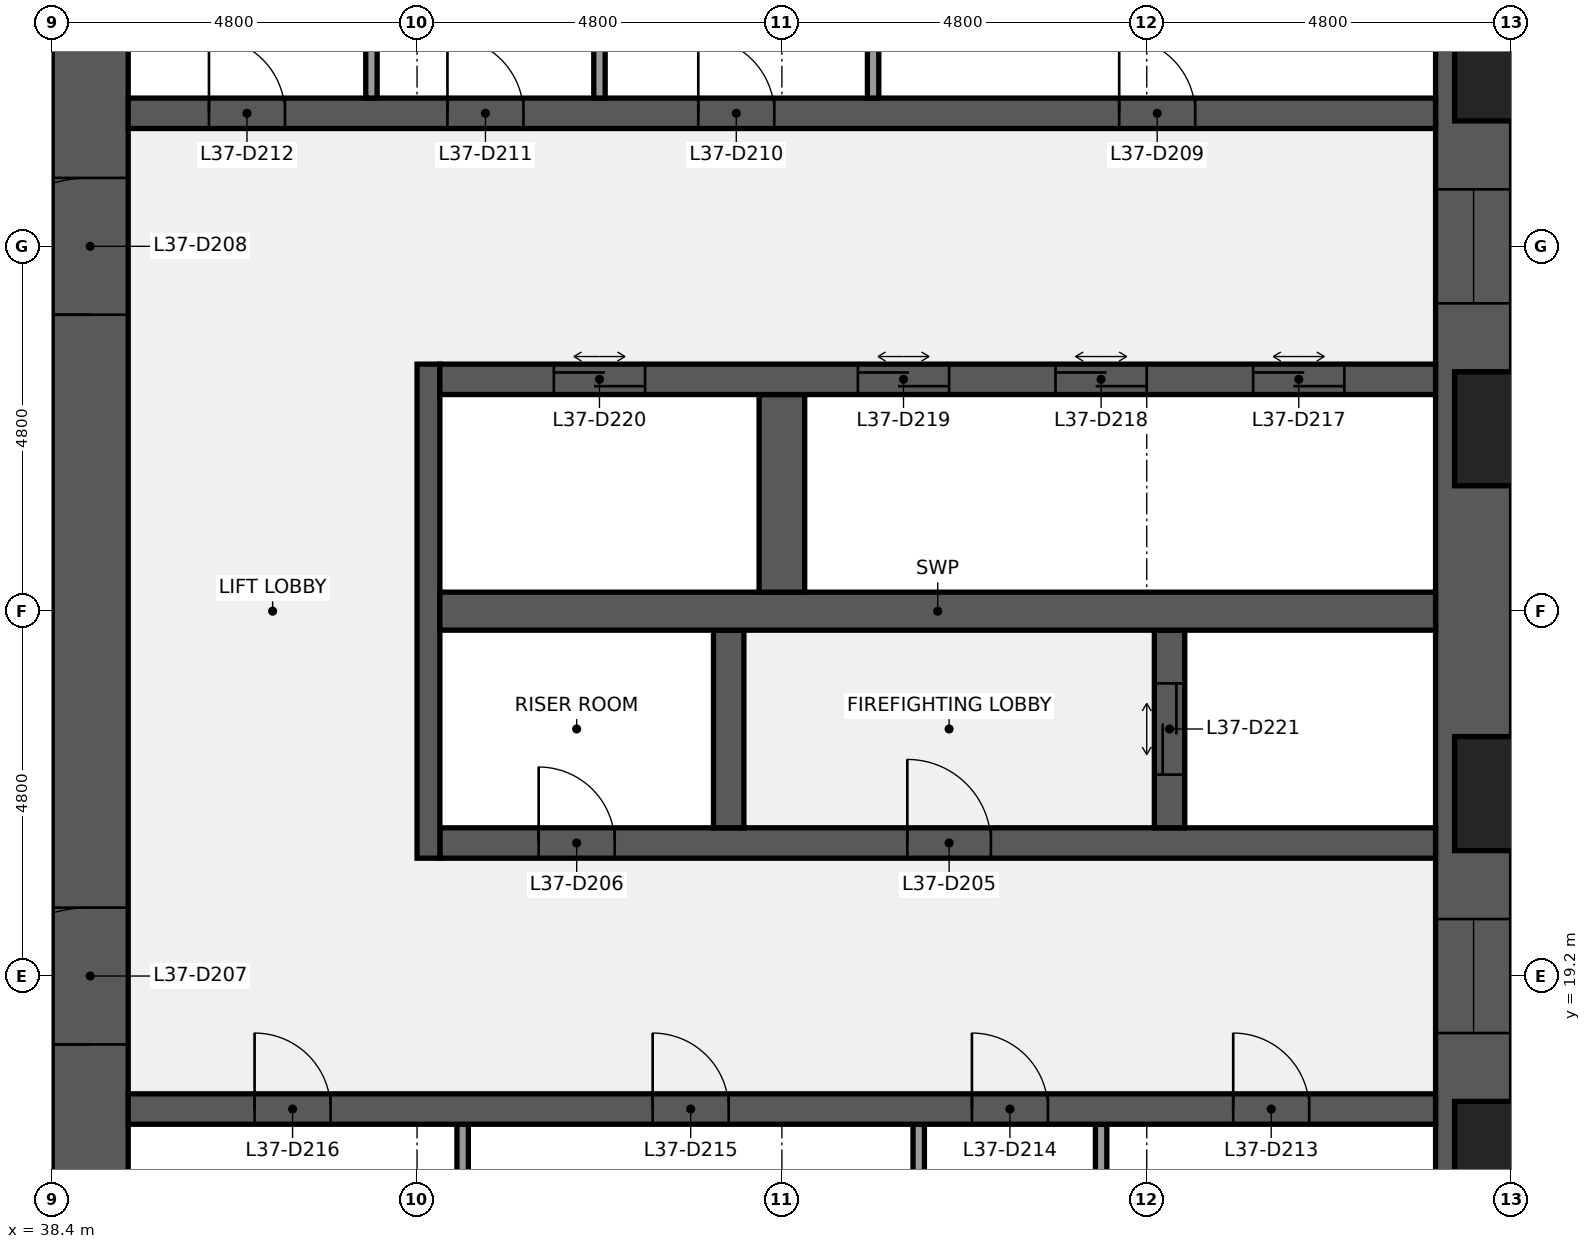
"""IFC4 building model, lengths in metres.
Left out: names, types, materials, properties, quantities, classifications, styles, units other than length and angle.
Written with IfcOpenShell. Run it as: python <this file> out.ifc"""

import sys

from ifc_helpers import new_model, si_unit, direction, frame, frame_2d, origin, place, context, subcontext, project, spatial, rectangle, extrude, element, fill, save


model = new_model("IFC4")
c1 = context("Model", 3, precision=1e-05, world=origin(), true_north=direction((0.0, 1.0)))
c2 = subcontext(c1, "Body", "Model", "MODEL_VIEW")
j1 = project(units=[si_unit("LENGTHUNIT", "METRE"), si_unit("PLANEANGLEUNIT", "RADIAN")], contexts=[c1])
p1 = place(None, origin())
s1 = spatial("IfcSite", under=j1, at=p1, CompositionType="ELEMENT")
p2 = place(p1, origin())
s2 = spatial("IfcBuilding", under=s1, at=p2, CompositionType="ELEMENT")
p3 = place(p2, frame((0.0, 0.0, 168.1)))
s3 = spatial("IfcBuildingStorey", under=s2, at=p3, CompositionType="ELEMENT", Elevation=168.1)
p4 = place(p3, frame((57.1, 38.4, 0.0), z_axis=(0.0, 0.0, 1.0), x_axis=(0.0, -1.0, 0.0)))
e1 = element("IfcWall", 1, at=p4, inside=s3, PredefinedType="SHEAR", context=c2, shape_type="SweptSolid", body=[
    extrude(rectangle(XDim=28.8, YDim=1.0, at=frame_2d((14.4, 0.0))), origin(), (0.0, 0.0, 1.0), 3.84),
])
p5 = place(p4, frame((18.45, 0.0, 0.9)))
e2 = element("IfcOpeningElement", 2, at=p5, cuts=e1, PredefinedType="OPENING", context=c2, shape_type="SweptSolid", body=[
    extrude(rectangle(XDim=1.5, YDim=1.5, at=frame_2d((0.75, 0.75))), frame((0.0, 0.51, 0.0), z_axis=(0.0, -1.0, 0.0), x_axis=(1.0, 0.0, 0.0)), (0.0, 0.0, 1.0), 1.02),
])
p6 = place(p4, frame((8.85, 0.0, 0.9)))
e3 = element("IfcOpeningElement", 3, at=p6, cuts=e1, PredefinedType="OPENING", context=c2, shape_type="SweptSolid", body=[
    extrude(rectangle(XDim=1.5, YDim=1.5, at=frame_2d((0.75, 0.75))), frame((0.0, 0.51, 0.0), z_axis=(0.0, -1.0, 0.0), x_axis=(1.0, 0.0, 0.0)), (0.0, 0.0, 1.0), 1.02),
])
p7 = place(p3, frame((38.9, 9.6, 0.0), z_axis=(0.0, 0.0, 1.0), x_axis=(0.0, 1.0, 0.0)))
e4 = element("IfcWall", 4, at=p7, inside=s3, PredefinedType="SHEAR", context=c2, shape_type="SweptSolid", body=[
    extrude(rectangle(XDim=28.8, YDim=1.0, at=frame_2d((14.4, 0.0))), origin(), (0.0, 0.0, 1.0), 3.84),
])
p8 = place(p7, frame((8.7, 0.0, 0.0)))
e5 = element("IfcOpeningElement", 5, at=p8, cuts=e4, PredefinedType="OPENING", context=c2, shape_type="SweptSolid", body=[
    extrude(rectangle(XDim=1.8, YDim=2.1, at=frame_2d((0.9, 1.05))), frame((0.0, 0.51, 0.0), z_axis=(0.0, -1.0, 0.0), x_axis=(1.0, 0.0, 0.0)), (0.0, 0.0, 1.0), 1.02),
])
p9 = place(p7, frame((18.3, 0.0, 0.0)))
e6 = element("IfcOpeningElement", 6, at=p9, cuts=e4, PredefinedType="OPENING", context=c2, shape_type="SweptSolid", body=[
    extrude(rectangle(XDim=1.8, YDim=2.1, at=frame_2d((0.9, 1.05))), frame((0.0, 0.51, 0.0), z_axis=(0.0, -1.0, 0.0), x_axis=(1.0, 0.0, 0.0)), (0.0, 0.0, 1.0), 1.02),
])
for number, where, z_axis, x_axis in (
    (7, (52.2, 14.65, 0.0), (0.0, 0.0, 1.0), (0.0, 1.0, 0.0)),
    (8, (49.8, 14.65, 0.0), (0.0, 0.0, 1.0), (0.0, 1.0, 0.0)),
    (9, (43.8, 14.65, 0.0), (0.0, 0.0, 1.0), (0.0, 1.0, 0.0)),
):
    element("IfcWall", number, at=place(p3, frame(where, z_axis=z_axis, x_axis=x_axis)), inside=s3, PredefinedType="PARTITIONING", context=c2, shape_type="SweptSolid", body=[
        extrude(rectangle(XDim=2.6, YDim=0.15, at=frame_2d((1.3, 0.0))), origin(), (0.0, 0.0, 1.0), 3.84),
    ])
p10 = place(p3, frame((39.4, 17.45, 0.0), z_axis=(0.0, 0.0, 1.0), x_axis=(1.0, 0.0, 0.0)))
e10 = element("IfcWall", 10, at=p10, inside=s3, PredefinedType="SHEAR", context=c2, shape_type="SweptSolid", body=[
    extrude(rectangle(XDim=17.2, YDim=0.4, at=frame_2d((8.6, 0.0))), origin(), (0.0, 0.0, 1.0), 3.84),
])
p11 = place(p10, frame((14.538, 0.0, 0.0)))
e11 = element("IfcOpeningElement", 11, at=p11, cuts=e10, PredefinedType="OPENING", context=c2, shape_type="SweptSolid", body=[
    extrude(rectangle(XDim=1.0, YDim=2.1, at=frame_2d((0.5, 1.05))), frame((0.0, 0.21, 0.0), z_axis=(0.0, -1.0, 0.0), x_axis=(1.0, 0.0, 0.0)), (0.0, 0.0, 1.0), 0.42),
])
p12 = place(p10, frame((11.1, 0.0, 0.0)))
e12 = element("IfcOpeningElement", 12, at=p12, cuts=e10, PredefinedType="OPENING", context=c2, shape_type="SweptSolid", body=[
    extrude(rectangle(XDim=1.0, YDim=2.1, at=frame_2d((0.5, 1.05))), frame((0.0, 0.21, 0.0), z_axis=(0.0, -1.0, 0.0), x_axis=(1.0, 0.0, 0.0)), (0.0, 0.0, 1.0), 0.42),
])
p13 = place(p10, frame((6.9, 0.0, 0.0)))
e13 = element("IfcOpeningElement", 13, at=p13, cuts=e10, PredefinedType="OPENING", context=c2, shape_type="SweptSolid", body=[
    extrude(rectangle(XDim=1.0, YDim=2.1, at=frame_2d((0.5, 1.05))), frame((0.0, 0.21, 0.0), z_axis=(0.0, -1.0, 0.0), x_axis=(1.0, 0.0, 0.0)), (0.0, 0.0, 1.0), 0.42),
])
p14 = place(p10, frame((1.663, 0.0, 0.0)))
e14 = element("IfcOpeningElement", 14, at=p14, cuts=e10, PredefinedType="OPENING", context=c2, shape_type="SweptSolid", body=[
    extrude(rectangle(XDim=1.0, YDim=2.1, at=frame_2d((0.5, 1.05))), frame((0.0, 0.21, 0.0), z_axis=(0.0, -1.0, 0.0), x_axis=(1.0, 0.0, 0.0)), (0.0, 0.0, 1.0), 0.42),
])
p15 = place(p3, frame((43.5, 20.95, 0.0), z_axis=(0.0, 0.0, 1.0), x_axis=(1.0, 0.0, 0.0)))
e15 = element("IfcWall", 15, at=p15, inside=s3, PredefinedType="SHEAR", context=c2, shape_type="SweptSolid", body=[
    extrude(rectangle(XDim=13.1, YDim=0.4, at=frame_2d((6.55, 0.0))), origin(), (0.0, 0.0, 1.0), 3.84),
])
p16 = place(p15, frame((6.15, 0.0, 0.0)))
e16 = element("IfcOpeningElement", 16, at=p16, cuts=e15, PredefinedType="OPENING", context=c2, shape_type="SweptSolid", body=[
    extrude(rectangle(XDim=1.1, YDim=2.1, at=frame_2d((0.55, 1.05))), frame((0.0, 0.21, 0.0), z_axis=(0.0, -1.0, 0.0), x_axis=(1.0, 0.0, 0.0)), (0.0, 0.0, 1.0), 0.42),
])
p17 = place(p15, frame((1.3, 0.0, 0.0)))
e17 = element("IfcOpeningElement", 17, at=p17, cuts=e15, PredefinedType="OPENING", context=c2, shape_type="SweptSolid", body=[
    extrude(rectangle(XDim=1.0, YDim=2.1, at=frame_2d((0.5, 1.05))), frame((0.0, 0.21, 0.0), z_axis=(0.0, -1.0, 0.0), x_axis=(1.0, 0.0, 0.0)), (0.0, 0.0, 1.0), 0.42),
])
p18 = place(p3, frame((43.35, 20.75, 0.0), z_axis=(0.0, 0.0, 1.0), x_axis=(0.0, 1.0, 0.0)))
e18 = element("IfcWall", 18, at=p18, inside=s3, PredefinedType="SHEAR", context=c2, shape_type="SweptSolid", body=[
    extrude(rectangle(XDim=6.5, YDim=0.3, at=frame_2d((3.25, 0.0))), origin(), (0.0, 0.0, 1.0), 3.84),
])
p19 = place(p3, frame((53.1, 21.15, 0.0), z_axis=(0.0, 0.0, 1.0), x_axis=(0.0, 1.0, 0.0)))
e19 = element("IfcWall", 19, at=p19, inside=s3, PredefinedType="SHEAR", context=c2, shape_type="SweptSolid", body=[
    extrude(rectangle(XDim=2.6, YDim=0.4, at=frame_2d((1.3, 0.0))), origin(), (0.0, 0.0, 1.0), 3.84),
])
p20 = place(p19, frame((0.7, 0.0, 0.0)))
e20 = element("IfcOpeningElement", 20, at=p20, cuts=e19, PredefinedType="OPENING", context=c2, shape_type="SweptSolid", body=[
    extrude(rectangle(XDim=1.2, YDim=2.1, at=frame_2d((0.6, 1.05))), frame((0.0, 0.21, 0.0), z_axis=(0.0, -1.0, 0.0), x_axis=(1.0, 0.0, 0.0)), (0.0, 0.0, 1.0), 0.42),
])
p21 = place(p3, frame((47.3, 21.15, 0.0), z_axis=(0.0, 0.0, 1.0), x_axis=(0.0, 1.0, 0.0)))
e21 = element("IfcWall", 21, at=p21, inside=s3, PredefinedType="SHEAR", context=c2, shape_type="SweptSolid", body=[
    extrude(rectangle(XDim=2.6, YDim=0.4, at=frame_2d((1.3, 0.0))), origin(), (0.0, 0.0, 1.0), 3.84),
])
p22 = place(p3, frame((43.5, 24.0, 0.0), z_axis=(0.0, 0.0, 1.0), x_axis=(1.0, 0.0, 0.0)))
e22 = element("IfcWall", 22, at=p22, inside=s3, PredefinedType="SHEAR", context=c2, shape_type="SweptSolid", body=[
    extrude(rectangle(XDim=13.1, YDim=0.5, at=frame_2d((6.55, 0.0))), origin(), (0.0, 0.0, 1.0), 3.84),
])
p23 = place(p3, frame((48.0, 24.25, 0.0), z_axis=(0.0, 0.0, 1.0), x_axis=(0.0, 1.0, 0.0)))
e23 = element("IfcWall", 23, at=p23, inside=s3, PredefinedType="SHEAR", context=c2, shape_type="SweptSolid", body=[
    extrude(rectangle(XDim=2.6, YDim=0.6, at=frame_2d((1.3, 0.0))), origin(), (0.0, 0.0, 1.0), 3.84),
])
p24 = place(p3, frame((43.5, 27.05, 0.0), z_axis=(0.0, 0.0, 1.0), x_axis=(1.0, 0.0, 0.0)))
e24 = element("IfcWall", 24, at=p24, inside=s3, PredefinedType="SHEAR", context=c2, shape_type="SweptSolid", body=[
    extrude(rectangle(XDim=13.1, YDim=0.4, at=frame_2d((6.55, 0.0))), origin(), (0.0, 0.0, 1.0), 3.84),
])
p25 = place(p24, frame((10.7, 0.0, 0.0)))
e25 = element("IfcOpeningElement", 25, at=p25, cuts=e24, PredefinedType="OPENING", context=c2, shape_type="SweptSolid", body=[
    extrude(rectangle(XDim=1.2, YDim=2.1, at=frame_2d((0.6, 1.05))), frame((0.0, 0.21, 0.0), z_axis=(0.0, -1.0, 0.0), x_axis=(1.0, 0.0, 0.0)), (0.0, 0.0, 1.0), 0.42),
])
p26 = place(p24, frame((8.1, 0.0, 0.0)))
e26 = element("IfcOpeningElement", 26, at=p26, cuts=e24, PredefinedType="OPENING", context=c2, shape_type="SweptSolid", body=[
    extrude(rectangle(XDim=1.2, YDim=2.1, at=frame_2d((0.6, 1.05))), frame((0.0, 0.21, 0.0), z_axis=(0.0, -1.0, 0.0), x_axis=(1.0, 0.0, 0.0)), (0.0, 0.0, 1.0), 0.42),
])
p27 = place(p24, frame((5.5, 0.0, 0.0)))
e27 = element("IfcOpeningElement", 27, at=p27, cuts=e24, PredefinedType="OPENING", context=c2, shape_type="SweptSolid", body=[
    extrude(rectangle(XDim=1.2, YDim=2.1, at=frame_2d((0.6, 1.05))), frame((0.0, 0.21, 0.0), z_axis=(0.0, -1.0, 0.0), x_axis=(1.0, 0.0, 0.0)), (0.0, 0.0, 1.0), 0.42),
])
p28 = place(p24, frame((1.5, 0.0, 0.0)))
e28 = element("IfcOpeningElement", 28, at=p28, cuts=e24, PredefinedType="OPENING", context=c2, shape_type="SweptSolid", body=[
    extrude(rectangle(XDim=1.2, YDim=2.1, at=frame_2d((0.6, 1.05))), frame((0.0, 0.21, 0.0), z_axis=(0.0, -1.0, 0.0), x_axis=(1.0, 0.0, 0.0)), (0.0, 0.0, 1.0), 0.42),
])
p29 = place(p3, frame((39.4, 30.55, 0.0), z_axis=(0.0, 0.0, 1.0), x_axis=(1.0, 0.0, 0.0)))
e29 = element("IfcWall", 29, at=p29, inside=s3, PredefinedType="SHEAR", context=c2, shape_type="SweptSolid", body=[
    extrude(rectangle(XDim=17.2, YDim=0.4, at=frame_2d((8.6, 0.0))), origin(), (0.0, 0.0, 1.0), 3.84),
])
p30 = place(p29, frame((13.038, 0.0, 0.0)))
e30 = element("IfcOpeningElement", 30, at=p30, cuts=e29, PredefinedType="OPENING", context=c2, shape_type="SweptSolid", body=[
    extrude(rectangle(XDim=1.0, YDim=2.1, at=frame_2d((0.5, 1.05))), frame((0.0, 0.21, 0.0), z_axis=(0.0, -1.0, 0.0), x_axis=(1.0, 0.0, 0.0)), (0.0, 0.0, 1.0), 0.42),
])
p31 = place(p29, frame((7.5, 0.0, 0.0)))
e31 = element("IfcOpeningElement", 31, at=p31, cuts=e29, PredefinedType="OPENING", context=c2, shape_type="SweptSolid", body=[
    extrude(rectangle(XDim=1.0, YDim=2.1, at=frame_2d((0.5, 1.05))), frame((0.0, 0.21, 0.0), z_axis=(0.0, -1.0, 0.0), x_axis=(1.0, 0.0, 0.0)), (0.0, 0.0, 1.0), 0.42),
])
p32 = place(p29, frame((4.2, 0.0, 0.0)))
e32 = element("IfcOpeningElement", 32, at=p32, cuts=e29, PredefinedType="OPENING", context=c2, shape_type="SweptSolid", body=[
    extrude(rectangle(XDim=1.0, YDim=2.1, at=frame_2d((0.5, 1.05))), frame((0.0, 0.21, 0.0), z_axis=(0.0, -1.0, 0.0), x_axis=(1.0, 0.0, 0.0)), (0.0, 0.0, 1.0), 0.42),
])
p33 = place(p29, frame((1.062, 0.0, 0.0)))
e33 = element("IfcOpeningElement", 33, at=p33, cuts=e29, PredefinedType="OPENING", context=c2, shape_type="SweptSolid", body=[
    extrude(rectangle(XDim=1.0, YDim=2.1, at=frame_2d((0.5, 1.05))), frame((0.0, 0.21, 0.0), z_axis=(0.0, -1.0, 0.0), x_axis=(1.0, 0.0, 0.0)), (0.0, 0.0, 1.0), 0.42),
])
for number, where, z_axis, x_axis in (
    (34, (49.2, 30.75, 0.0), (0.0, 0.0, 1.0), (0.0, 1.0, 0.0)),
    (35, (45.6, 30.75, 0.0), (0.0, 0.0, 1.0), (0.0, 1.0, 0.0)),
    (36, (42.6, 30.75, 0.0), (0.0, 0.0, 1.0), (0.0, 1.0, 0.0)),
):
    element("IfcWall", number, at=place(p3, frame(where, z_axis=z_axis, x_axis=x_axis)), inside=s3, PredefinedType="PARTITIONING", context=c2, shape_type="SweptSolid", body=[
        extrude(rectangle(XDim=2.6, YDim=0.15, at=frame_2d((1.3, 0.0))), origin(), (0.0, 0.0, 1.0), 3.84),
    ])
p34 = place(p16, origin())
e37 = element("IfcDoor", 37, at=p34, inside=s3, OperationType="SINGLE_SWING_LEFT", PredefinedType="DOOR", context=c2, shape_type="SweptSolid", body=[
    extrude(rectangle(XDim=1.1, YDim=2.1, at=frame_2d((0.55, 1.05))), frame((0.0, 0.025, 0.0), z_axis=(0.0, -1.0, 0.0), x_axis=(1.0, 0.0, 0.0)), (0.0, 0.0, 1.0), 0.05),
])
fill(e16, e37)
p35 = place(p17, origin())
e38 = element("IfcDoor", 38, at=p35, inside=s3, OperationType="SINGLE_SWING_LEFT", PredefinedType="DOOR", context=c2, shape_type="SweptSolid", body=[
    extrude(rectangle(XDim=1.0, YDim=2.1, at=frame_2d((0.5, 1.05))), frame((0.0, 0.025, 0.0), z_axis=(0.0, -1.0, 0.0), x_axis=(1.0, 0.0, 0.0)), (0.0, 0.0, 1.0), 0.05),
])
fill(e17, e38)
p36 = place(p8, origin())
e39 = element("IfcDoor", 39, at=p36, inside=s3, OperationType="DOUBLE_DOOR_SINGLE_SWING", PredefinedType="DOOR", context=c2, shape_type="SweptSolid", body=[
    extrude(rectangle(XDim=1.8, YDim=2.1, at=frame_2d((0.9, 1.05))), frame((0.0, 0.025, 0.0), z_axis=(0.0, -1.0, 0.0), x_axis=(1.0, 0.0, 0.0)), (0.0, 0.0, 1.0), 0.05),
])
fill(e5, e39)
p37 = place(p9, origin())
e40 = element("IfcDoor", 40, at=p37, inside=s3, OperationType="DOUBLE_DOOR_SINGLE_SWING", PredefinedType="DOOR", context=c2, shape_type="SweptSolid", body=[
    extrude(rectangle(XDim=1.8, YDim=2.1, at=frame_2d((0.9, 1.05))), frame((0.0, 0.025, 0.0), z_axis=(0.0, -1.0, 0.0), x_axis=(1.0, 0.0, 0.0)), (0.0, 0.0, 1.0), 0.05),
])
fill(e6, e40)
p38 = place(p30, origin())
e41 = element("IfcDoor", 41, at=p38, inside=s3, OperationType="SINGLE_SWING_LEFT", PredefinedType="DOOR", context=c2, shape_type="SweptSolid", body=[
    extrude(rectangle(XDim=1.0, YDim=2.1, at=frame_2d((0.5, 1.05))), frame((0.0, 0.025, 0.0), z_axis=(0.0, -1.0, 0.0), x_axis=(1.0, 0.0, 0.0)), (0.0, 0.0, 1.0), 0.05),
])
fill(e30, e41)
p39 = place(p31, origin())
e42 = element("IfcDoor", 42, at=p39, inside=s3, OperationType="SINGLE_SWING_LEFT", PredefinedType="DOOR", context=c2, shape_type="SweptSolid", body=[
    extrude(rectangle(XDim=1.0, YDim=2.1, at=frame_2d((0.5, 1.05))), frame((0.0, 0.025, 0.0), z_axis=(0.0, -1.0, 0.0), x_axis=(1.0, 0.0, 0.0)), (0.0, 0.0, 1.0), 0.05),
])
fill(e31, e42)
p40 = place(p32, origin())
e43 = element("IfcDoor", 43, at=p40, inside=s3, OperationType="SINGLE_SWING_LEFT", PredefinedType="DOOR", context=c2, shape_type="SweptSolid", body=[
    extrude(rectangle(XDim=1.0, YDim=2.1, at=frame_2d((0.5, 1.05))), frame((0.0, 0.025, 0.0), z_axis=(0.0, -1.0, 0.0), x_axis=(1.0, 0.0, 0.0)), (0.0, 0.0, 1.0), 0.05),
])
fill(e32, e43)
p41 = place(p33, origin())
e44 = element("IfcDoor", 44, at=p41, inside=s3, OperationType="SINGLE_SWING_LEFT", PredefinedType="DOOR", context=c2, shape_type="SweptSolid", body=[
    extrude(rectangle(XDim=1.0, YDim=2.1, at=frame_2d((0.5, 1.05))), frame((0.0, 0.025, 0.0), z_axis=(0.0, -1.0, 0.0), x_axis=(1.0, 0.0, 0.0)), (0.0, 0.0, 1.0), 0.05),
])
fill(e33, e44)
p42 = place(p11, origin())
e45 = element("IfcDoor", 45, at=p42, inside=s3, OperationType="SINGLE_SWING_LEFT", PredefinedType="DOOR", context=c2, shape_type="SweptSolid", body=[
    extrude(rectangle(XDim=1.0, YDim=2.1, at=frame_2d((0.5, 1.05))), frame((0.0, 0.025, 0.0), z_axis=(0.0, -1.0, 0.0), x_axis=(1.0, 0.0, 0.0)), (0.0, 0.0, 1.0), 0.05),
])
fill(e11, e45)
p43 = place(p12, origin())
e46 = element("IfcDoor", 46, at=p43, inside=s3, OperationType="SINGLE_SWING_LEFT", PredefinedType="DOOR", context=c2, shape_type="SweptSolid", body=[
    extrude(rectangle(XDim=1.0, YDim=2.1, at=frame_2d((0.5, 1.05))), frame((0.0, 0.025, 0.0), z_axis=(0.0, -1.0, 0.0), x_axis=(1.0, 0.0, 0.0)), (0.0, 0.0, 1.0), 0.05),
])
fill(e12, e46)
p44 = place(p13, origin())
e47 = element("IfcDoor", 47, at=p44, inside=s3, OperationType="SINGLE_SWING_LEFT", PredefinedType="DOOR", context=c2, shape_type="SweptSolid", body=[
    extrude(rectangle(XDim=1.0, YDim=2.1, at=frame_2d((0.5, 1.05))), frame((0.0, 0.025, 0.0), z_axis=(0.0, -1.0, 0.0), x_axis=(1.0, 0.0, 0.0)), (0.0, 0.0, 1.0), 0.05),
])
fill(e13, e47)
p45 = place(p14, origin())
e48 = element("IfcDoor", 48, at=p45, inside=s3, OperationType="SINGLE_SWING_LEFT", PredefinedType="DOOR", context=c2, shape_type="SweptSolid", body=[
    extrude(rectangle(XDim=1.0, YDim=2.1, at=frame_2d((0.5, 1.05))), frame((0.0, 0.025, 0.0), z_axis=(0.0, -1.0, 0.0), x_axis=(1.0, 0.0, 0.0)), (0.0, 0.0, 1.0), 0.05),
])
fill(e14, e48)
p46 = place(p25, origin())
e49 = element("IfcDoor", 49, at=p46, inside=s3, OperationType="DOUBLE_DOOR_SLIDING", PredefinedType="DOOR", context=c2, shape_type="SweptSolid", body=[
    extrude(rectangle(XDim=1.2, YDim=2.1, at=frame_2d((0.6, 1.05))), frame((0.0, 0.025, 0.0), z_axis=(0.0, -1.0, 0.0), x_axis=(1.0, 0.0, 0.0)), (0.0, 0.0, 1.0), 0.05),
])
fill(e25, e49)
p47 = place(p26, origin())
e50 = element("IfcDoor", 50, at=p47, inside=s3, OperationType="DOUBLE_DOOR_SLIDING", PredefinedType="DOOR", context=c2, shape_type="SweptSolid", body=[
    extrude(rectangle(XDim=1.2, YDim=2.1, at=frame_2d((0.6, 1.05))), frame((0.0, 0.025, 0.0), z_axis=(0.0, -1.0, 0.0), x_axis=(1.0, 0.0, 0.0)), (0.0, 0.0, 1.0), 0.05),
])
fill(e26, e50)
p48 = place(p27, origin())
e51 = element("IfcDoor", 51, at=p48, inside=s3, OperationType="DOUBLE_DOOR_SLIDING", PredefinedType="DOOR", context=c2, shape_type="SweptSolid", body=[
    extrude(rectangle(XDim=1.2, YDim=2.1, at=frame_2d((0.6, 1.05))), frame((0.0, 0.025, 0.0), z_axis=(0.0, -1.0, 0.0), x_axis=(1.0, 0.0, 0.0)), (0.0, 0.0, 1.0), 0.05),
])
fill(e27, e51)
p49 = place(p28, origin())
e52 = element("IfcDoor", 52, at=p49, inside=s3, OperationType="DOUBLE_DOOR_SLIDING", PredefinedType="DOOR", context=c2, shape_type="SweptSolid", body=[
    extrude(rectangle(XDim=1.2, YDim=2.1, at=frame_2d((0.6, 1.05))), frame((0.0, 0.025, 0.0), z_axis=(0.0, -1.0, 0.0), x_axis=(1.0, 0.0, 0.0)), (0.0, 0.0, 1.0), 0.05),
])
fill(e28, e52)
p50 = place(p20, origin())
e53 = element("IfcDoor", 53, at=p50, inside=s3, OperationType="DOUBLE_DOOR_SLIDING", PredefinedType="DOOR", context=c2, shape_type="SweptSolid", body=[
    extrude(rectangle(XDim=1.2, YDim=2.1, at=frame_2d((0.6, 1.05))), frame((0.0, 0.025, 0.0), z_axis=(0.0, -1.0, 0.0), x_axis=(1.0, 0.0, 0.0)), (0.0, 0.0, 1.0), 0.05),
])
fill(e20, e53)
p51 = place(p5, origin())
e54 = element("IfcWindow", 54, at=p51, inside=s3, PartitioningType="SINGLE_PANEL", PredefinedType="WINDOW", context=c2, shape_type="SweptSolid", body=[
    extrude(rectangle(XDim=1.5, YDim=1.5, at=frame_2d((0.75, 0.75))), frame((0.0, 0.03, 0.0), z_axis=(0.0, -1.0, 0.0), x_axis=(1.0, 0.0, 0.0)), (0.0, 0.0, 1.0), 0.06),
])
fill(e2, e54)
p52 = place(p6, origin())
e55 = element("IfcWindow", 55, at=p52, inside=s3, PartitioningType="SINGLE_PANEL", PredefinedType="WINDOW", context=c2, shape_type="SweptSolid", body=[
    extrude(rectangle(XDim=1.5, YDim=1.5, at=frame_2d((0.75, 0.75))), frame((0.0, 0.03, 0.0), z_axis=(0.0, -1.0, 0.0), x_axis=(1.0, 0.0, 0.0)), (0.0, 0.0, 1.0), 0.06),
])
fill(e3, e55)
save(model, sys.argv[1])
